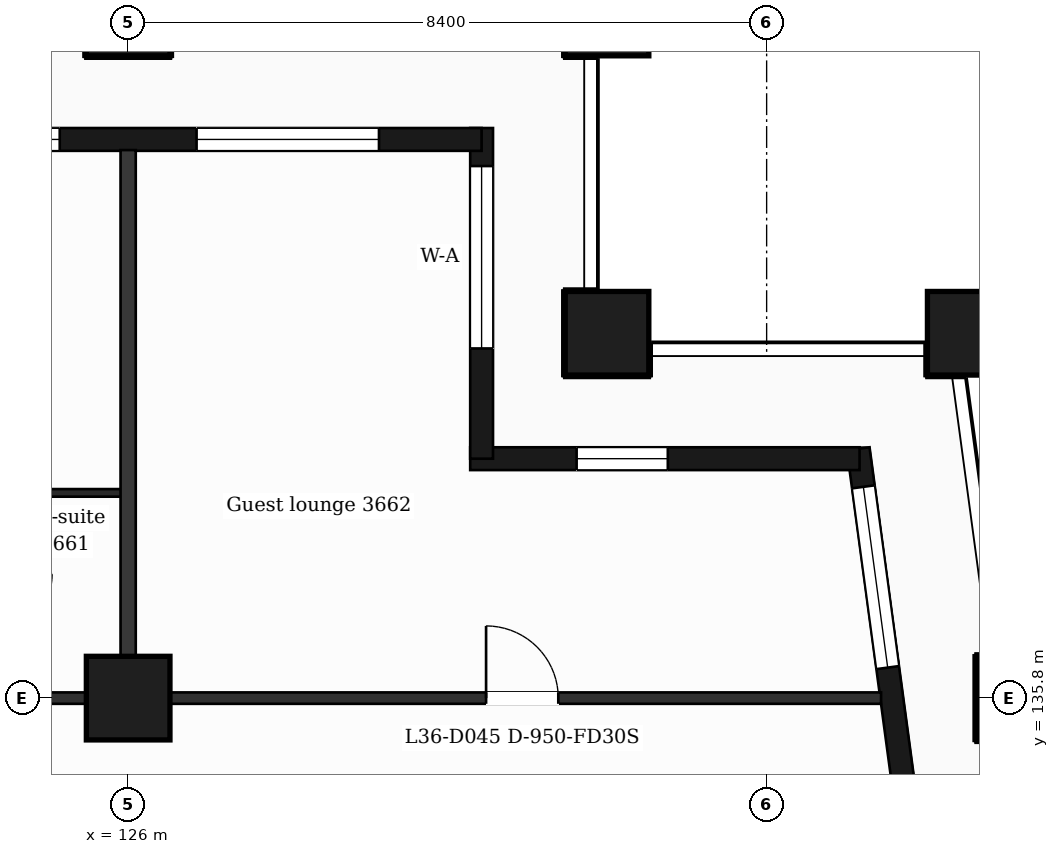
"""IFC4 building model, lengths in metres.
Left out: names, types, materials, properties, quantities, classifications, styles, units other than length and angle.
Written with IfcOpenShell. Run it as: python <this file> out.ifc"""

import sys

from ifc_helpers import new_model, si_unit, direction, frame, frame_2d, origin, origin_2d, place, context, subcontext, project, spatial, rectangle, extrude, element, fill, save


model = new_model("IFC4")
c1 = context("Model", 3, precision=1e-05, world=origin(), true_north=direction((0.0, 1.0)))
c2 = subcontext(c1, "Body", "Model", "MODEL_VIEW")
j1 = project(units=[si_unit("LENGTHUNIT", "METRE"), si_unit("PLANEANGLEUNIT", "RADIAN")], contexts=[c1])
p1 = place(None, origin())
s1 = spatial("IfcSite", under=j1, at=p1, CompositionType="ELEMENT")
p2 = place(p1, origin())
s2 = spatial("IfcBuilding", under=s1, at=p2, CompositionType="ELEMENT")
p3 = place(p2, frame((0.0, 0.0, 155.2)))
s3 = spatial("IfcBuildingStorey", under=s2, at=p3, CompositionType="ELEMENT", Elevation=155.2)
for number, where, z_axis, x_axis in (
    (1, (132.3, 140.6, 0.0), (0.0, 0.0, 1.0), (1.0, 0.0, 0.0)),
    (2, (137.065, 140.6, 0.0), (0.0, 0.0, 1.0), (1.0, 0.0, 0.0)),
    (3, (126.0, 135.8, 0.0), (0.0, 0.0, 1.0), (1.0, 0.0, 0.0)),
    (4, (137.711, 135.8, 0.0), (0.0, 0.0, 1.0), (1.0, 0.0, 0.0)),
    (5, (126.0, 144.8, 0.0), (0.0, 0.0, 1.0), (1.0, 0.0, 0.0)),
    (6, (132.3, 144.8, 0.0), (0.0, 0.0, 1.0), (1.0, 0.0, 0.0)),
):
    element("IfcColumn", number, at=place(p3, frame(where, z_axis=z_axis, x_axis=x_axis)), inside=s3, PredefinedType="COLUMN", context=c2, shape_type="SweptSolid", body=[
        extrude(rectangle(XDim=1.1, YDim=1.1, at=origin_2d()), origin(), (0.0, 0.0, 1.0), 3.7),
    ])
p4 = place(p3, frame((136.504, 132.4, 0.0), z_axis=(0.0, 0.0, 1.0), x_axis=(-0.133399697462, 0.99106231929, 0.0)))
e7 = element("IfcWall", 7, at=p4, inside=s3, PredefinedType="SOLIDWALL", context=c2, shape_type="SweptSolid", body=[
    extrude(rectangle(XDim=6.74, YDim=0.3, at=frame_2d((3.37, 0.0))), origin(), (0.0, 0.0, 1.0), 3.38),
])
p5 = place(p4, frame((1.115, 0.0, 0.0)))
e8 = element("IfcOpeningElement", 8, at=p5, cuts=e7, PredefinedType="OPENING", context=c2, shape_type="SweptSolid", body=[
    extrude(rectangle(XDim=1.2, YDim=2.4, at=frame_2d((0.6, 1.2))), frame((0.0, 0.16, 0.0), z_axis=(0.0, -1.0, 0.0), x_axis=(1.0, 0.0, 0.0)), (0.0, 0.0, 1.0), 0.32),
])
p6 = place(p4, frame((3.835, 0.0, 0.9)))
e9 = element("IfcOpeningElement", 9, at=p6, cuts=e7, PredefinedType="OPENING", context=c2, shape_type="SweptSolid", body=[
    extrude(rectangle(XDim=2.4, YDim=2.1, at=frame_2d((1.2, 1.05))), frame((0.0, 0.16, 0.0), z_axis=(0.0, -1.0, 0.0), x_axis=(1.0, 0.0, 0.0)), (0.0, 0.0, 1.0), 0.32),
])
p7 = place(p3, frame((135.623, 138.95, 0.0), z_axis=(0.0, 0.0, 1.0), x_axis=(-1.0, 0.0, 0.0)))
e10 = element("IfcWall", 10, at=p7, inside=s3, PredefinedType="SOLIDWALL", context=c2, shape_type="SweptSolid", body=[
    extrude(rectangle(XDim=5.123, YDim=0.3, at=frame_2d((2.561, 0.0))), origin(), (0.0, 0.0, 1.0), 3.38),
])
p8 = place(p7, frame((2.523, 0.0, 0.9)))
e11 = element("IfcOpeningElement", 11, at=p8, cuts=e10, PredefinedType="OPENING", context=c2, shape_type="SweptSolid", body=[
    extrude(rectangle(XDim=1.2, YDim=2.1, at=frame_2d((0.6, 1.05))), frame((0.0, 0.16, 0.0), z_axis=(0.0, -1.0, 0.0), x_axis=(1.0, 0.0, 0.0)), (0.0, 0.0, 1.0), 0.32),
])
p9 = place(p3, frame((130.65, 138.95, 0.0), z_axis=(0.0, 0.0, 1.0), x_axis=(0.0, 1.0, 0.0)))
e12 = element("IfcWall", 12, at=p9, inside=s3, PredefinedType="SOLIDWALL", context=c2, shape_type="SweptSolid", body=[
    extrude(rectangle(XDim=4.35, YDim=0.3, at=frame_2d((2.175, 0.0))), origin(), (0.0, 0.0, 1.0), 3.38),
])
p10 = place(p9, frame((1.45, 0.0, 0.9)))
e13 = element("IfcOpeningElement", 13, at=p10, cuts=e12, PredefinedType="OPENING", context=c2, shape_type="SweptSolid", body=[
    extrude(rectangle(XDim=2.4, YDim=2.1, at=frame_2d((1.2, 1.05))), frame((0.0, 0.16, 0.0), z_axis=(0.0, -1.0, 0.0), x_axis=(1.0, 0.0, 0.0)), (0.0, 0.0, 1.0), 0.32),
])
p11 = place(p3, frame((130.65, 143.15, 0.0), z_axis=(0.0, 0.0, 1.0), x_axis=(-1.0, 0.0, 0.0)))
e14 = element("IfcWall", 14, at=p11, inside=s3, PredefinedType="SOLIDWALL", context=c2, shape_type="SweptSolid", body=[
    extrude(rectangle(XDim=16.35, YDim=0.3, at=frame_2d((8.175, 0.0))), origin(), (0.0, 0.0, 1.0), 3.38),
])
p12 = place(p11, frame((1.35, 0.0, 0.9)))
e15 = element("IfcOpeningElement", 15, at=p12, cuts=e14, PredefinedType="OPENING", context=c2, shape_type="SweptSolid", body=[
    extrude(rectangle(XDim=2.4, YDim=2.1, at=frame_2d((1.2, 1.05))), frame((0.0, 0.16, 0.0), z_axis=(0.0, -1.0, 0.0), x_axis=(1.0, 0.0, 0.0)), (0.0, 0.0, 1.0), 0.32),
])
p13 = place(p11, frame((5.55, 0.0, 0.9)))
e16 = element("IfcOpeningElement", 16, at=p13, cuts=e14, PredefinedType="OPENING", context=c2, shape_type="SweptSolid", body=[
    extrude(rectangle(XDim=2.4, YDim=2.1, at=frame_2d((1.2, 1.05))), frame((0.0, 0.16, 0.0), z_axis=(0.0, -1.0, 0.0), x_axis=(1.0, 0.0, 0.0)), (0.0, 0.0, 1.0), 0.32),
])
p14 = place(p11, frame((9.45, 0.0, 0.0)))
e17 = element("IfcOpeningElement", 17, at=p14, cuts=e14, PredefinedType="OPENING", context=c2, shape_type="SweptSolid", body=[
    extrude(rectangle(XDim=1.2, YDim=2.4, at=frame_2d((0.6, 1.2))), frame((0.0, 0.16, 0.0), z_axis=(0.0, -1.0, 0.0), x_axis=(1.0, 0.0, 0.0)), (0.0, 0.0, 1.0), 0.32),
])
p15 = place(p11, frame((11.25, 0.0, 0.9)))
e18 = element("IfcOpeningElement", 18, at=p15, cuts=e14, PredefinedType="OPENING", context=c2, shape_type="SweptSolid", body=[
    extrude(rectangle(XDim=1.2, YDim=2.1, at=frame_2d((0.6, 1.05))), frame((0.0, 0.16, 0.0), z_axis=(0.0, -1.0, 0.0), x_axis=(1.0, 0.0, 0.0)), (0.0, 0.0, 1.0), 0.32),
])
p16 = place(p11, frame((13.45, 0.0, 0.9)))
e19 = element("IfcOpeningElement", 19, at=p16, cuts=e14, PredefinedType="OPENING", context=c2, shape_type="SweptSolid", body=[
    extrude(rectangle(XDim=2.4, YDim=2.1, at=frame_2d((1.2, 1.05))), frame((0.0, 0.16, 0.0), z_axis=(0.0, -1.0, 0.0), x_axis=(1.0, 0.0, 0.0)), (0.0, 0.0, 1.0), 0.32),
])
p17 = place(p3, frame((90.895, 135.8, 0.0), z_axis=(0.0, 0.0, 1.0), x_axis=(1.0, 0.0, 0.0)))
e20 = element("IfcWall", 20, at=p17, inside=s3, PredefinedType="PARTITIONING", context=c2, shape_type="SweptSolid", body=[
    extrude(rectangle(XDim=45.011, YDim=0.15, at=frame_2d((22.505, 0.0))), origin(), (0.0, 0.0, 1.0), 3.38),
])
p18 = place(p17, frame((6.906, 0.0, 0.0)))
e21 = element("IfcOpeningElement", 21, at=p18, cuts=e20, PredefinedType="OPENING", context=c2, shape_type="SweptSolid", body=[
    extrude(rectangle(XDim=1.0, YDim=2.1, at=frame_2d((0.5, 1.05))), frame((0.0, 0.085, 0.0), z_axis=(0.0, -1.0, 0.0), x_axis=(1.0, 0.0, 0.0)), (0.0, 0.0, 1.0), 0.17),
])
p19 = place(p17, frame((12.935, 0.0, 0.0)))
e22 = element("IfcOpeningElement", 22, at=p19, cuts=e20, PredefinedType="OPENING", context=c2, shape_type="SweptSolid", body=[
    extrude(rectangle(XDim=1.0, YDim=2.1, at=frame_2d((0.5, 1.05))), frame((0.0, 0.085, 0.0), z_axis=(0.0, -1.0, 0.0), x_axis=(1.0, 0.0, 0.0)), (0.0, 0.0, 1.0), 0.17),
])
p20 = place(p17, frame((27.477, 0.0, 0.0)))
e23 = element("IfcOpeningElement", 23, at=p20, cuts=e20, PredefinedType="OPENING", context=c2, shape_type="SweptSolid", body=[
    extrude(rectangle(XDim=0.95, YDim=2.1, at=frame_2d((0.475, 1.05))), frame((0.0, 0.085, 0.0), z_axis=(0.0, -1.0, 0.0), x_axis=(1.0, 0.0, 0.0)), (0.0, 0.0, 1.0), 0.17),
])
p21 = place(p17, frame((31.555, 0.0, 0.0)))
e24 = element("IfcOpeningElement", 24, at=p21, cuts=e20, PredefinedType="OPENING", context=c2, shape_type="SweptSolid", body=[
    extrude(rectangle(XDim=0.95, YDim=2.1, at=frame_2d((0.475, 1.05))), frame((0.0, 0.085, 0.0), z_axis=(0.0, -1.0, 0.0), x_axis=(1.0, 0.0, 0.0)), (0.0, 0.0, 1.0), 0.17),
])
p22 = place(p17, frame((39.814, 0.0, 0.0)))
e25 = element("IfcOpeningElement", 25, at=p22, cuts=e20, PredefinedType="OPENING", context=c2, shape_type="SweptSolid", body=[
    extrude(rectangle(XDim=0.95, YDim=2.1, at=frame_2d((0.475, 1.05))), frame((0.0, 0.085, 0.0), z_axis=(0.0, -1.0, 0.0), x_axis=(1.0, 0.0, 0.0)), (0.0, 0.0, 1.0), 0.17),
])
p23 = place(p3, frame((124.15, 138.5, 0.0), z_axis=(0.0, 0.0, 1.0), x_axis=(1.0, 0.0, 0.0)))
e26 = element("IfcWall", 26, at=p23, inside=s3, PredefinedType="PARTITIONING", context=c2, shape_type="SweptSolid", body=[
    extrude(rectangle(XDim=1.85, YDim=0.1, at=frame_2d((0.925, 0.0))), origin(), (0.0, 0.0, 1.0), 3.38),
])
p24 = place(p3, frame((126.0, 135.875, 0.0), z_axis=(0.0, 0.0, 1.0), x_axis=(0.0, 1.0, 0.0)))
e27 = element("IfcWall", 27, at=p24, inside=s3, PredefinedType="PARTITIONING", context=c2, shape_type="SweptSolid", body=[
    extrude(rectangle(XDim=7.135, YDim=0.2, at=frame_2d((3.567, 0.0))), origin(), (0.0, 0.0, 1.0), 3.38),
])
p25 = place(p6, origin())
e28 = element("IfcWindow", 28, at=p25, inside=s3, PartitioningType="SINGLE_PANEL", PredefinedType="WINDOW", context=c2, shape_type="SweptSolid", body=[
    extrude(rectangle(XDim=2.4, YDim=2.1, at=frame_2d((1.2, 1.05))), frame((0.0, 0.03, 0.0), z_axis=(0.0, -1.0, 0.0), x_axis=(1.0, 0.0, 0.0)), (0.0, 0.0, 1.0), 0.06),
])
fill(e9, e28)
p26 = place(p8, origin())
e29 = element("IfcWindow", 29, at=p26, inside=s3, PartitioningType="SINGLE_PANEL", PredefinedType="WINDOW", context=c2, shape_type="SweptSolid", body=[
    extrude(rectangle(XDim=1.2, YDim=2.1, at=frame_2d((0.6, 1.05))), frame((0.0, 0.03, 0.0), z_axis=(0.0, -1.0, 0.0), x_axis=(1.0, 0.0, 0.0)), (0.0, 0.0, 1.0), 0.06),
])
fill(e11, e29)
p27 = place(p10, origin())
e30 = element("IfcWindow", 30, at=p27, inside=s3, PartitioningType="SINGLE_PANEL", PredefinedType="WINDOW", context=c2, shape_type="SweptSolid", body=[
    extrude(rectangle(XDim=2.4, YDim=2.1, at=frame_2d((1.2, 1.05))), frame((0.0, 0.03, 0.0), z_axis=(0.0, -1.0, 0.0), x_axis=(1.0, 0.0, 0.0)), (0.0, 0.0, 1.0), 0.06),
])
fill(e13, e30)
p28 = place(p12, origin())
e31 = element("IfcWindow", 31, at=p28, inside=s3, PartitioningType="SINGLE_PANEL", PredefinedType="WINDOW", context=c2, shape_type="SweptSolid", body=[
    extrude(rectangle(XDim=2.4, YDim=2.1, at=frame_2d((1.2, 1.05))), frame((0.0, 0.03, 0.0), z_axis=(0.0, -1.0, 0.0), x_axis=(1.0, 0.0, 0.0)), (0.0, 0.0, 1.0), 0.06),
])
fill(e15, e31)
p29 = place(p13, origin())
e32 = element("IfcWindow", 32, at=p29, inside=s3, PartitioningType="SINGLE_PANEL", PredefinedType="WINDOW", context=c2, shape_type="SweptSolid", body=[
    extrude(rectangle(XDim=2.4, YDim=2.1, at=frame_2d((1.2, 1.05))), frame((0.0, 0.03, 0.0), z_axis=(0.0, -1.0, 0.0), x_axis=(1.0, 0.0, 0.0)), (0.0, 0.0, 1.0), 0.06),
])
fill(e16, e32)
p30 = place(p22, origin())
e33 = element("IfcDoor", 33, at=p30, inside=s3, OperationType="SINGLE_SWING_LEFT", PredefinedType="DOOR", context=c2, shape_type="SweptSolid", body=[
    extrude(rectangle(XDim=0.95, YDim=2.1, at=frame_2d((0.475, 1.05))), frame((0.0, 0.025, 0.0), z_axis=(0.0, -1.0, 0.0), x_axis=(1.0, 0.0, 0.0)), (0.0, 0.0, 1.0), 0.05),
])
fill(e25, e33)
save(model, sys.argv[1])
